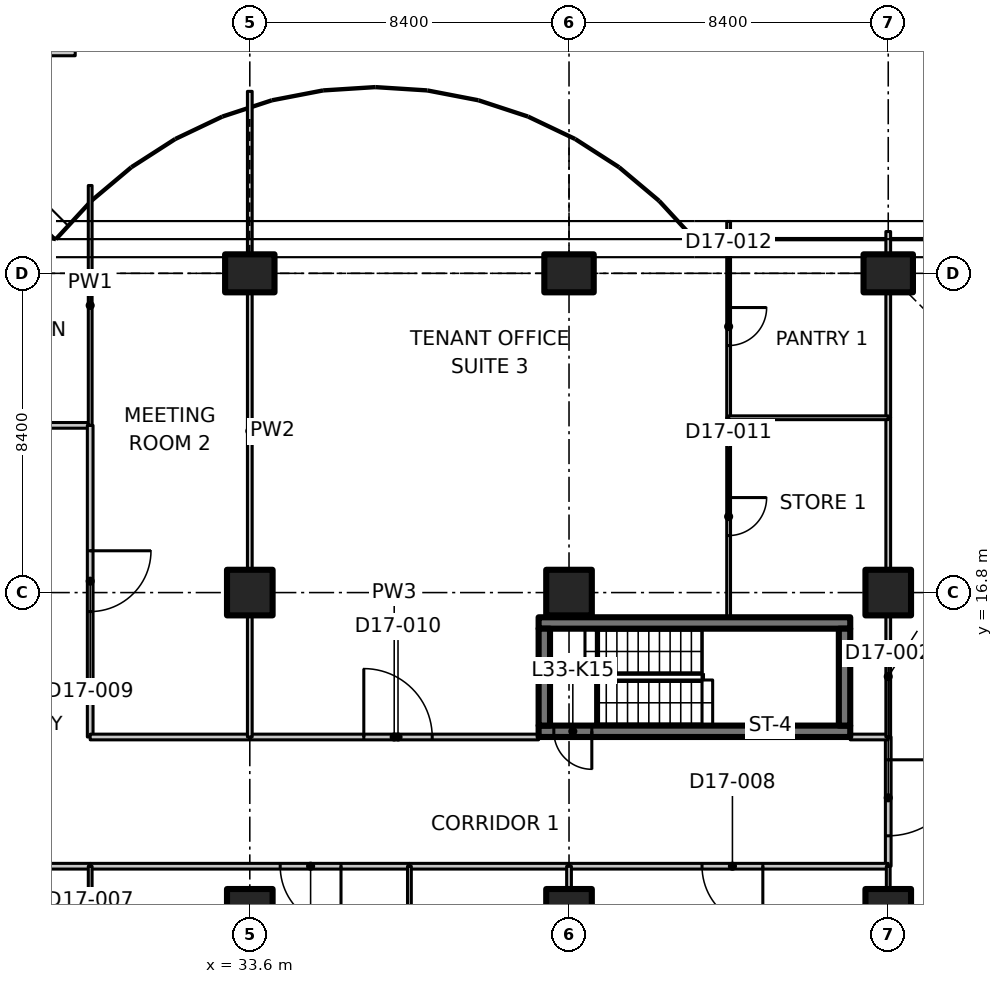
"""IFC4 building model, lengths in metres.
Left out: names, types, materials, properties, quantities, classifications, styles, units other than length and angle.
Written with IfcOpenShell. Run it as: python <this file> out.ifc"""

import sys

from ifc_helpers import new_model, si_unit, direction, frame, frame_2d, origin, origin_2d, place, context, subcontext, project, spatial, polyline, rectangle, outline, extrude, element, fill, save


model = new_model("IFC4")
c1 = context("Model", 3, precision=1e-05, world=origin(), true_north=direction((0.0, 1.0)))
c2 = subcontext(c1, "Body", "Model", "MODEL_VIEW")
j1 = project(units=[si_unit("LENGTHUNIT", "METRE"), si_unit("PLANEANGLEUNIT", "RADIAN")], contexts=[c1])
p1 = place(None, origin())
s1 = spatial("IfcSite", under=j1, at=p1, CompositionType="ELEMENT")
p2 = place(p1, origin())
s2 = spatial("IfcBuilding", under=s1, at=p2, CompositionType="ELEMENT")
p3 = place(p2, frame((0.0, 0.0, 134.9)))
s3 = spatial("IfcBuildingStorey", under=s2, at=p3, CompositionType="ELEMENT", Elevation=134.9)
for number, where, z_axis, x_axis in (
    (1, (33.6, 8.4, 0.0), (0.0, 0.0, 1.0), (1.0, 0.0, 0.0)),
    (2, (33.6, 16.8, 0.0), (0.0, 0.0, 1.0), (1.0, 0.0, 0.0)),
):
    element("IfcColumn", number, at=place(p3, frame(where, z_axis=z_axis, x_axis=x_axis)), inside=s3, PredefinedType="COLUMN", context=c2, shape_type="SweptSolid", body=[
        extrude(rectangle(XDim=1.2, YDim=1.2, at=origin_2d()), origin(), (0.0, 0.0, 1.0), 3.35),
    ])
p4 = place(p3, frame((33.6, 25.2, 0.0), z_axis=(0.0, 0.0, 1.0), x_axis=(0.0, 1.0, 0.0)))
e3 = element("IfcColumn", 3, at=p4, inside=s3, PredefinedType="COLUMN", context=c2, shape_type="SweptSolid", body=[
    extrude(rectangle(XDim=1.0, YDim=1.3, at=origin_2d()), origin(), (0.0, 0.0, 1.0), 3.35),
])
for number, where, z_axis, x_axis in (
    (4, (42.0, 8.4, 0.0), (0.0, 0.0, 1.0), (1.0, 0.0, 0.0)),
    (5, (42.0, 16.8, 0.0), (0.0, 0.0, 1.0), (1.0, 0.0, 0.0)),
):
    element("IfcColumn", number, at=place(p3, frame(where, z_axis=z_axis, x_axis=x_axis)), inside=s3, PredefinedType="COLUMN", context=c2, shape_type="SweptSolid", body=[
        extrude(rectangle(XDim=1.2, YDim=1.2, at=origin_2d()), origin(), (0.0, 0.0, 1.0), 3.35),
    ])
p5 = place(p3, frame((42.0, 25.2, 0.0), z_axis=(0.0, 0.0, 1.0), x_axis=(0.0, 1.0, 0.0)))
e6 = element("IfcColumn", 6, at=p5, inside=s3, PredefinedType="COLUMN", context=c2, shape_type="SweptSolid", body=[
    extrude(rectangle(XDim=1.0, YDim=1.3, at=origin_2d()), origin(), (0.0, 0.0, 1.0), 3.35),
])
for number, where, z_axis, x_axis in (
    (7, (50.4, 8.4, 0.0), (0.0, 0.0, 1.0), (1.0, 0.0, 0.0)),
    (8, (50.4, 16.8, 0.0), (0.0, 0.0, 1.0), (1.0, 0.0, 0.0)),
):
    element("IfcColumn", number, at=place(p3, frame(where, z_axis=z_axis, x_axis=x_axis)), inside=s3, PredefinedType="COLUMN", context=c2, shape_type="SweptSolid", body=[
        extrude(rectangle(XDim=1.2, YDim=1.2, at=origin_2d()), origin(), (0.0, 0.0, 1.0), 3.35),
    ])
p6 = place(p3, frame((50.4, 25.2, 0.0), z_axis=(0.0, 0.0, 1.0), x_axis=(0.0, 1.0, 0.0)))
e9 = element("IfcColumn", 9, at=p6, inside=s3, PredefinedType="COLUMN", context=c2, shape_type="SweptSolid", body=[
    extrude(rectangle(XDim=1.0, YDim=1.3, at=origin_2d()), origin(), (0.0, 0.0, 1.0), 3.35),
])
p7 = place(p3, frame((49.4, 13.15, 0.0), z_axis=(0.0, 0.0, 1.0), x_axis=(-1.0, 0.0, 0.0)))
e10 = element("IfcWall", 10, at=p7, inside=s3, PredefinedType="SHEAR", context=c2, shape_type="SweptSolid", body=[
    extrude(rectangle(XDim=8.2, YDim=0.3, at=frame_2d((4.1, 0.0))), origin(), (0.0, 0.0, 1.0), 3.35),
])
p8 = place(p7, frame((6.8, 0.0, 0.0)))
e11 = element("IfcOpeningElement", 11, at=p8, cuts=e10, PredefinedType="OPENING", context=c2, shape_type="SweptSolid", body=[
    extrude(rectangle(XDim=1.0, YDim=2.1, at=frame_2d((0.5, 1.05))), frame((0.0, 0.16, 0.0), z_axis=(0.0, -1.0, 0.0), x_axis=(1.0, 0.0, 0.0)), (0.0, 0.0, 1.0), 0.32),
])
p9 = place(p3, frame((41.2, 16.0, 0.0), z_axis=(0.0, 0.0, 1.0), x_axis=(1.0, 0.0, 0.0)))
e12 = element("IfcWall", 12, at=p9, inside=s3, PredefinedType="SHEAR", context=c2, shape_type="SweptSolid", body=[
    extrude(rectangle(XDim=8.2, YDim=0.3, at=frame_2d((4.1, 0.0))), origin(), (0.0, 0.0, 1.0), 3.35),
])
for number, where, z_axis, x_axis in (
    (13, (41.35, 13.3, 0.0), (0.0, 0.0, 1.0), (0.0, 1.0, 0.0)),
    (14, (49.25, 13.3, 0.0), (0.0, 0.0, 1.0), (0.0, 1.0, 0.0)),
):
    element("IfcWall", number, at=place(p3, frame(where, z_axis=z_axis, x_axis=x_axis)), inside=s3, PredefinedType="SHEAR", context=c2, shape_type="SweptSolid", body=[
        extrude(rectangle(XDim=2.55, YDim=0.3, at=frame_2d((1.275, 0.0))), origin(), (0.0, 0.0, 1.0), 3.35),
    ])
for number, where, z_axis, x_axis in (
    (15, (25.2, 21.2, 0.0), (0.0, 0.0, 1.0), (1.0, 0.0, 0.0)),
    (16, (29.4, 9.6, 0.0), (0.0, 0.0, 1.0), (-1.0, 0.0, 0.0)),
):
    element("IfcWall", number, at=place(p3, frame(where, z_axis=z_axis, x_axis=x_axis)), inside=s3, PredefinedType="PARTITIONING", context=c2, shape_type="SweptSolid", body=[
        extrude(rectangle(XDim=4.2, YDim=0.15, at=frame_2d((2.1, 0.0))), origin(), (0.0, 0.0, 1.0), 3.33),
    ])
p10 = place(p3, frame((29.4, 21.2, 0.0), z_axis=(0.0, 0.0, 1.0), x_axis=(0.0, -1.0, 0.0)))
e17 = element("IfcWall", 17, at=p10, inside=s3, PredefinedType="PARTITIONING", context=c2, shape_type="SweptSolid", body=[
    extrude(rectangle(XDim=8.2, YDim=0.15, at=frame_2d((4.1, 0.0))), origin(), (0.0, 0.0, 1.0), 3.33),
])
p11 = place(p10, frame((3.3, 0.0, 0.0)))
e18 = element("IfcOpeningElement", 18, at=p11, cuts=e17, PredefinedType="OPENING", context=c2, shape_type="SweptSolid", body=[
    extrude(rectangle(XDim=1.6, YDim=2.1, at=frame_2d((0.8, 1.05))), frame((0.0, 0.085, 0.0), z_axis=(0.0, -1.0, 0.0), x_axis=(1.0, 0.0, 0.0)), (0.0, 0.0, 1.0), 0.17),
])
p12 = place(p3, frame((29.4, 27.511, 0.0), z_axis=(0.0, 0.0, 1.0), x_axis=(0.0, -1.0, 0.0)))
e19 = element("IfcWall", 19, at=p12, inside=s3, PredefinedType="PARTITIONING", context=c2, shape_type="SweptSolid", body=[
    extrude(outline(polyline([(0.0, 0.0), (6.311, 0.0), (6.311, 3.33), (2.761, 3.33), (2.759, 2.98), (1.863, 2.98), (1.861, 3.33), (0.236, 3.33), (0.0, 3.33), (0.0, 0.0)])), frame((0.0, 0.05, 0.0), z_axis=(0.0, -1.0, 0.0), x_axis=(1.0, 0.0, 0.0)), (0.0, 0.0, 1.0), 0.1),
])
p13 = place(p3, frame((25.2, 31.0, 0.0), z_axis=(0.0, 0.0, 1.0), x_axis=(1.0, 0.0, 0.0)))
e20 = element("IfcWall", 20, at=p13, inside=s3, PredefinedType="PARTITIONING", context=c2, shape_type="SweptSolid", body=[
    extrude(rectangle(XDim=3.806, YDim=0.15, at=frame_2d((1.903, 0.0))), origin(), (0.0, 0.0, 1.0), 2.98),
])
p14 = place(p3, frame((50.4, 13.0, 0.0), z_axis=(0.0, 0.0, 1.0), x_axis=(0.0, -1.0, 0.0)))
e21 = element("IfcWall", 21, at=p14, inside=s3, PredefinedType="PARTITIONING", context=c2, shape_type="SweptSolid", body=[
    extrude(rectangle(XDim=3.4, YDim=0.15, at=frame_2d((1.7, 0.0))), origin(), (0.0, 0.0, 1.0), 3.33),
])
p15 = place(p14, frame((0.6, 0.0, 0.0)))
e22 = element("IfcOpeningElement", 22, at=p15, cuts=e21, PredefinedType="OPENING", context=c2, shape_type="SweptSolid", body=[
    extrude(rectangle(XDim=2.0, YDim=2.4, at=frame_2d((1.0, 1.2))), frame((0.0, 0.085, 0.0), z_axis=(0.0, -1.0, 0.0), x_axis=(1.0, 0.0, 0.0)), (0.0, 0.0, 1.0), 0.17),
])
p16 = place(p3, frame((37.8, 9.6, 0.0), z_axis=(0.0, 0.0, 1.0), x_axis=(-1.0, 0.0, 0.0)))
e23 = element("IfcWall", 23, at=p16, inside=s3, PredefinedType="PARTITIONING", context=c2, shape_type="SweptSolid", body=[
    extrude(rectangle(XDim=8.4, YDim=0.15, at=frame_2d((4.2, 0.0))), origin(), (0.0, 0.0, 1.0), 3.33),
])
p17 = place(p16, frame((1.8, 0.0, 0.0)))
e24 = element("IfcOpeningElement", 24, at=p17, cuts=e23, PredefinedType="OPENING", context=c2, shape_type="SweptSolid", body=[
    extrude(rectangle(XDim=1.6, YDim=2.1, at=frame_2d((0.8, 1.05))), frame((0.0, 0.085, 0.0), z_axis=(0.0, -1.0, 0.0), x_axis=(1.0, 0.0, 0.0)), (0.0, 0.0, 1.0), 0.17),
])
p18 = place(p3, frame((42.0, 9.6, 0.0), z_axis=(0.0, 0.0, 1.0), x_axis=(-1.0, 0.0, 0.0)))
e25 = element("IfcWall", 25, at=p18, inside=s3, PredefinedType="PARTITIONING", context=c2, shape_type="SweptSolid", body=[
    extrude(rectangle(XDim=4.2, YDim=0.15, at=frame_2d((2.1, 0.0))), origin(), (0.0, 0.0, 1.0), 3.33),
])
p19 = place(p3, frame((50.4, 9.6, 0.0), z_axis=(0.0, 0.0, 1.0), x_axis=(-1.0, 0.0, 0.0)))
e26 = element("IfcWall", 26, at=p19, inside=s3, PredefinedType="PARTITIONING", context=c2, shape_type="SweptSolid", body=[
    extrude(rectangle(XDim=8.4, YDim=0.15, at=frame_2d((4.2, 0.0))), origin(), (0.0, 0.0, 1.0), 3.33),
])
p20 = place(p19, frame((3.3, 0.0, 0.0)))
e27 = element("IfcOpeningElement", 27, at=p20, cuts=e26, PredefinedType="OPENING", context=c2, shape_type="SweptSolid", body=[
    extrude(rectangle(XDim=1.6, YDim=2.1, at=frame_2d((0.8, 1.05))), frame((0.0, 0.085, 0.0), z_axis=(0.0, -1.0, 0.0), x_axis=(1.0, 0.0, 0.0)), (0.0, 0.0, 1.0), 0.17),
])
p21 = place(p3, frame((29.4, 13.0, 0.0), z_axis=(0.0, 0.0, 1.0), x_axis=(1.0, 0.0, 0.0)))
e28 = element("IfcWall", 28, at=p21, inside=s3, PredefinedType="PARTITIONING", context=c2, shape_type="SweptSolid", body=[
    extrude(rectangle(XDim=4.2, YDim=0.15, at=frame_2d((2.1, 0.0))), origin(), (0.0, 0.0, 1.0), 3.33),
])
p22 = place(p3, frame((33.6, 13.0, 0.0), z_axis=(0.0, 0.0, 1.0), x_axis=(1.0, 0.0, 0.0)))
e29 = element("IfcWall", 29, at=p22, inside=s3, PredefinedType="PARTITIONING", context=c2, shape_type="SweptSolid", body=[
    extrude(rectangle(XDim=7.6, YDim=0.15, at=frame_2d((3.8, 0.0))), origin(), (0.0, 0.0, 1.0), 3.33),
])
p23 = place(p22, frame((3.0, 0.0, 0.0)))
e30 = element("IfcOpeningElement", 30, at=p23, cuts=e29, PredefinedType="OPENING", context=c2, shape_type="SweptSolid", body=[
    extrude(rectangle(XDim=1.8, YDim=2.1, at=frame_2d((0.9, 1.05))), frame((0.0, 0.085, 0.0), z_axis=(0.0, -1.0, 0.0), x_axis=(1.0, 0.0, 0.0)), (0.0, 0.0, 1.0), 0.17),
])
p24 = place(p3, frame((49.4, 13.0, 0.0), z_axis=(0.0, 0.0, 1.0), x_axis=(1.0, 0.0, 0.0)))
e31 = element("IfcWall", 31, at=p24, inside=s3, PredefinedType="PARTITIONING", context=c2, shape_type="SweptSolid", body=[
    extrude(rectangle(XDim=1.0, YDim=0.15, at=frame_2d((0.5, 0.0))), origin(), (0.0, 0.0, 1.0), 3.33),
])
p25 = place(p3, frame((50.4, 9.02, 0.0), z_axis=(0.0, 0.0, 1.0), x_axis=(0.0, 1.0, 0.0)))
e32 = element("IfcWall", 32, at=p25, inside=s3, PredefinedType="PARTITIONING", context=c2, shape_type="SweptSolid", body=[
    extrude(rectangle(XDim=0.58, YDim=0.1, at=frame_2d((0.29, 0.0))), origin(), (0.0, 0.0, 1.0), 3.33),
])
p26 = place(p3, frame((50.4, 13.0, 0.0), z_axis=(0.0, 0.0, 1.0), x_axis=(0.0, 1.0, 0.0)))
e33 = element("IfcWall", 33, at=p26, inside=s3, PredefinedType="PARTITIONING", context=c2, shape_type="SweptSolid", body=[
    extrude(rectangle(XDim=3.18, YDim=0.125, at=frame_2d((1.59, 0.0))), origin(), (0.0, 0.0, 1.0), 3.33),
])
p27 = place(p3, frame((50.4, 17.42, 0.0), z_axis=(0.0, 0.0, 1.0), x_axis=(0.0, 1.0, 0.0)))
e34 = element("IfcWall", 34, at=p27, inside=s3, PredefinedType="PARTITIONING", context=c2, shape_type="SweptSolid", body=[
    extrude(rectangle(XDim=3.98, YDim=0.125, at=frame_2d((1.99, 0.0))), origin(), (0.0, 0.0, 1.0), 3.33),
])
p28 = place(p3, frame((50.4, 21.4, 0.0), z_axis=(0.0, 0.0, 1.0), x_axis=(0.0, 1.0, 0.0)))
e35 = element("IfcWall", 35, at=p28, inside=s3, PredefinedType="PARTITIONING", context=c2, shape_type="SweptSolid", body=[
    extrude(rectangle(XDim=3.28, YDim=0.125, at=frame_2d((1.64, 0.0))), origin(), (0.0, 0.0, 1.0), 2.98),
])
p29 = place(p3, frame((50.4, 25.72, 0.0), z_axis=(0.0, 0.0, 1.0), x_axis=(0.0, 1.0, 0.0)))
e36 = element("IfcWall", 36, at=p29, inside=s3, PredefinedType="PARTITIONING", context=c2, shape_type="SweptSolid", body=[
    extrude(rectangle(XDim=0.58, YDim=0.125, at=frame_2d((0.29, 0.0))), origin(), (0.0, 0.0, 1.0), 3.33),
])
p30 = place(p3, frame((37.8, 9.6, 0.0), z_axis=(0.0, 0.0, 1.0), x_axis=(0.0, -1.0, 0.0)))
e37 = element("IfcWall", 37, at=p30, inside=s3, PredefinedType="PARTITIONING", context=c2, shape_type="SweptSolid", body=[
    extrude(rectangle(XDim=7.2, YDim=0.1, at=frame_2d((3.6, 0.0))), origin(), (0.0, 0.0, 1.0), 3.33),
])
p31 = place(p30, frame((3.0, 0.0, 0.0)))
e38 = element("IfcOpeningElement", 38, at=p31, cuts=e37, PredefinedType="OPENING", context=c2, shape_type="SweptSolid", body=[
    extrude(rectangle(XDim=1.0, YDim=2.1, at=frame_2d((0.5, 1.05))), frame((0.0, 0.06, 0.0), z_axis=(0.0, -1.0, 0.0), x_axis=(1.0, 0.0, 0.0)), (0.0, 0.0, 1.0), 0.12),
])
p32 = place(p3, frame((29.4, 3.6, 0.0), z_axis=(0.0, 0.0, 1.0), x_axis=(0.0, 1.0, 0.0)))
e39 = element("IfcWall", 39, at=p32, inside=s3, PredefinedType="PARTITIONING", context=c2, shape_type="SweptSolid", body=[
    extrude(rectangle(XDim=6.0, YDim=0.1, at=frame_2d((3.0, 0.0))), origin(), (0.0, 0.0, 1.0), 3.33),
])
p33 = place(p32, frame((2.4, 0.0, 0.0)))
e40 = element("IfcOpeningElement", 40, at=p33, cuts=e39, PredefinedType="OPENING", context=c2, shape_type="SweptSolid", body=[
    extrude(rectangle(XDim=1.0, YDim=2.1, at=frame_2d((0.5, 1.05))), frame((0.0, 0.06, 0.0), z_axis=(0.0, -1.0, 0.0), x_axis=(1.0, 0.0, 0.0)), (0.0, 0.0, 1.0), 0.12),
])
p34 = place(p3, frame((42.0, 9.6, 0.0), z_axis=(0.0, 0.0, 1.0), x_axis=(0.0, -1.0, 0.0)))
e41 = element("IfcWall", 41, at=p34, inside=s3, PredefinedType="PARTITIONING", context=c2, shape_type="SweptSolid", body=[
    extrude(rectangle(XDim=0.58, YDim=0.125, at=frame_2d((0.29, 0.0))), origin(), (0.0, 0.0, 1.0), 3.33),
])
p35 = place(p3, frame((33.6, 29.988, 0.0), z_axis=(0.0, 0.0, 1.0), x_axis=(0.0, -1.0, 0.0)))
e42 = element("IfcWall", 42, at=p35, inside=s3, PredefinedType="PARTITIONING", context=c2, shape_type="SweptSolid", body=[
    extrude(rectangle(XDim=4.268, YDim=0.125, at=frame_2d((2.134, 0.0))), origin(), (0.0, 0.0, 1.0), 2.98),
])
p36 = place(p3, frame((33.6, 24.68, 0.0), z_axis=(0.0, 0.0, 1.0), x_axis=(0.0, -1.0, 0.0)))
e43 = element("IfcWall", 43, at=p36, inside=s3, PredefinedType="PARTITIONING", context=c2, shape_type="SweptSolid", body=[
    extrude(rectangle(XDim=7.26, YDim=0.125, at=frame_2d((3.63, 0.0))), origin(), (0.0, 0.0, 1.0), 3.33),
])
p37 = place(p3, frame((33.6, 16.18, 0.0), z_axis=(0.0, 0.0, 1.0), x_axis=(0.0, -1.0, 0.0)))
e44 = element("IfcWall", 44, at=p37, inside=s3, PredefinedType="PARTITIONING", context=c2, shape_type="SweptSolid", body=[
    extrude(rectangle(XDim=3.18, YDim=0.125, at=frame_2d((1.59, 0.0))), origin(), (0.0, 0.0, 1.0), 3.33),
])
p38 = place(p3, frame((46.2, 21.4, 0.0), z_axis=(0.0, 0.0, 1.0), x_axis=(0.0, -1.0, 0.0)))
e45 = element("IfcWall", 45, at=p38, inside=s3, PredefinedType="PARTITIONING", context=c2, shape_type="SweptSolid", body=[
    extrude(rectangle(XDim=5.25, YDim=0.1, at=frame_2d((2.625, 0.0))), origin(), (0.0, 0.0, 1.0), 3.33),
])
p39 = place(p38, frame((2.1, 0.0, 0.0)))
e46 = element("IfcOpeningElement", 46, at=p39, cuts=e45, PredefinedType="OPENING", context=c2, shape_type="SweptSolid", body=[
    extrude(rectangle(XDim=1.0, YDim=2.1, at=frame_2d((0.5, 1.05))), frame((0.0, 0.06, 0.0), z_axis=(0.0, -1.0, 0.0), x_axis=(1.0, 0.0, 0.0)), (0.0, 0.0, 1.0), 0.12),
])
p40 = place(p3, frame((46.2, 26.565, 0.0), z_axis=(0.0, 0.0, 1.0), x_axis=(0.0, -1.0, 0.0)))
e47 = element("IfcWall", 47, at=p40, inside=s3, PredefinedType="PARTITIONING", context=c2, shape_type="SweptSolid", body=[
    extrude(outline(polyline([(0.0, 0.0), (5.165, 0.0), (5.165, 3.33), (1.815, 3.33), (1.813, 2.98), (0.917, 2.98), (0.915, 3.33), (0.265, 3.33), (0.0, 3.33), (0.0, 0.0)])), frame((0.0, 0.05, 0.0), z_axis=(0.0, -1.0, 0.0), x_axis=(1.0, 0.0, 0.0)), (0.0, 0.0, 1.0), 0.1),
])
p41 = place(p40, frame((2.265, 0.0, 0.0)))
e48 = element("IfcOpeningElement", 48, at=p41, cuts=e47, PredefinedType="OPENING", context=c2, shape_type="SweptSolid", body=[
    extrude(rectangle(XDim=1.0, YDim=2.1, at=frame_2d((0.5, 1.05))), frame((0.0, 0.06, 0.0), z_axis=(0.0, -1.0, 0.0), x_axis=(1.0, 0.0, 0.0)), (0.0, 0.0, 1.0), 0.12),
])
p42 = place(p3, frame((46.2, 21.4, 0.0), z_axis=(0.0, 0.0, 1.0), x_axis=(1.0, 0.0, 0.0)))
e49 = element("IfcWall", 49, at=p42, inside=s3, PredefinedType="PARTITIONING", context=c2, shape_type="SweptSolid", body=[
    extrude(rectangle(XDim=4.2, YDim=0.1, at=frame_2d((2.1, 0.0))), origin(), (0.0, 0.0, 1.0), 3.33),
])
p43 = place(p8, origin())
e50 = element("IfcDoor", 50, at=p43, inside=s3, OperationType="SINGLE_SWING_LEFT", PredefinedType="DOOR", context=c2, shape_type="SweptSolid", body=[
    extrude(rectangle(XDim=1.0, YDim=2.1, at=frame_2d((0.5, 1.05))), frame((0.0, 0.025, 0.0), z_axis=(0.0, -1.0, 0.0), x_axis=(1.0, 0.0, 0.0)), (0.0, 0.0, 1.0), 0.05),
])
fill(e11, e50)
p44 = place(p15, origin())
e51 = element("IfcDoor", 51, at=p44, inside=s3, OperationType="DOUBLE_DOOR_SINGLE_SWING", PredefinedType="DOOR", context=c2, shape_type="SweptSolid", body=[
    extrude(rectangle(XDim=2.0, YDim=2.4, at=frame_2d((1.0, 1.2))), frame((0.0, 0.025, 0.0), z_axis=(0.0, -1.0, 0.0), x_axis=(1.0, 0.0, 0.0)), (0.0, 0.0, 1.0), 0.05),
])
fill(e22, e51)
p45 = place(p17, origin())
e52 = element("IfcDoor", 52, at=p45, inside=s3, OperationType="DOUBLE_DOOR_SINGLE_SWING", PredefinedType="DOOR", context=c2, shape_type="SweptSolid", body=[
    extrude(rectangle(XDim=1.6, YDim=2.1, at=frame_2d((0.8, 1.05))), frame((0.0, 0.025, 0.0), z_axis=(0.0, -1.0, 0.0), x_axis=(1.0, 0.0, 0.0)), (0.0, 0.0, 1.0), 0.05),
])
fill(e24, e52)
p46 = place(p20, origin())
e53 = element("IfcDoor", 53, at=p46, inside=s3, OperationType="DOUBLE_DOOR_SINGLE_SWING", PredefinedType="DOOR", context=c2, shape_type="SweptSolid", body=[
    extrude(rectangle(XDim=1.6, YDim=2.1, at=frame_2d((0.8, 1.05))), frame((0.0, 0.025, 0.0), z_axis=(0.0, -1.0, 0.0), x_axis=(1.0, 0.0, 0.0)), (0.0, 0.0, 1.0), 0.05),
])
fill(e27, e53)
p47 = place(p11, origin())
e54 = element("IfcDoor", 54, at=p47, inside=s3, OperationType="DOUBLE_DOOR_SINGLE_SWING", PredefinedType="DOOR", context=c2, shape_type="SweptSolid", body=[
    extrude(rectangle(XDim=1.6, YDim=2.1, at=frame_2d((0.8, 1.05))), frame((0.0, 0.025, 0.0), z_axis=(0.0, -1.0, 0.0), x_axis=(1.0, 0.0, 0.0)), (0.0, 0.0, 1.0), 0.05),
])
fill(e18, e54)
p48 = place(p23, origin())
e55 = element("IfcDoor", 55, at=p48, inside=s3, OperationType="DOUBLE_DOOR_SINGLE_SWING", PredefinedType="DOOR", context=c2, shape_type="SweptSolid", body=[
    extrude(rectangle(XDim=1.8, YDim=2.1, at=frame_2d((0.9, 1.05))), frame((0.0, 0.025, 0.0), z_axis=(0.0, -1.0, 0.0), x_axis=(1.0, 0.0, 0.0)), (0.0, 0.0, 1.0), 0.05),
])
fill(e30, e55)
p49 = place(p39, origin())
e56 = element("IfcDoor", 56, at=p49, inside=s3, OperationType="SINGLE_SWING_LEFT", PredefinedType="DOOR", context=c2, shape_type="SweptSolid", body=[
    extrude(rectangle(XDim=1.0, YDim=2.1, at=frame_2d((0.5, 1.05))), frame((0.0, 0.025, 0.0), z_axis=(0.0, -1.0, 0.0), x_axis=(1.0, 0.0, 0.0)), (0.0, 0.0, 1.0), 0.05),
])
fill(e46, e56)
p50 = place(p41, origin())
e57 = element("IfcDoor", 57, at=p50, inside=s3, OperationType="SINGLE_SWING_LEFT", PredefinedType="DOOR", context=c2, shape_type="SweptSolid", body=[
    extrude(rectangle(XDim=1.0, YDim=2.1, at=frame_2d((0.5, 1.05))), frame((0.0, 0.025, 0.0), z_axis=(0.0, -1.0, 0.0), x_axis=(1.0, 0.0, 0.0)), (0.0, 0.0, 1.0), 0.05),
])
fill(e48, e57)
save(model, sys.argv[1])
